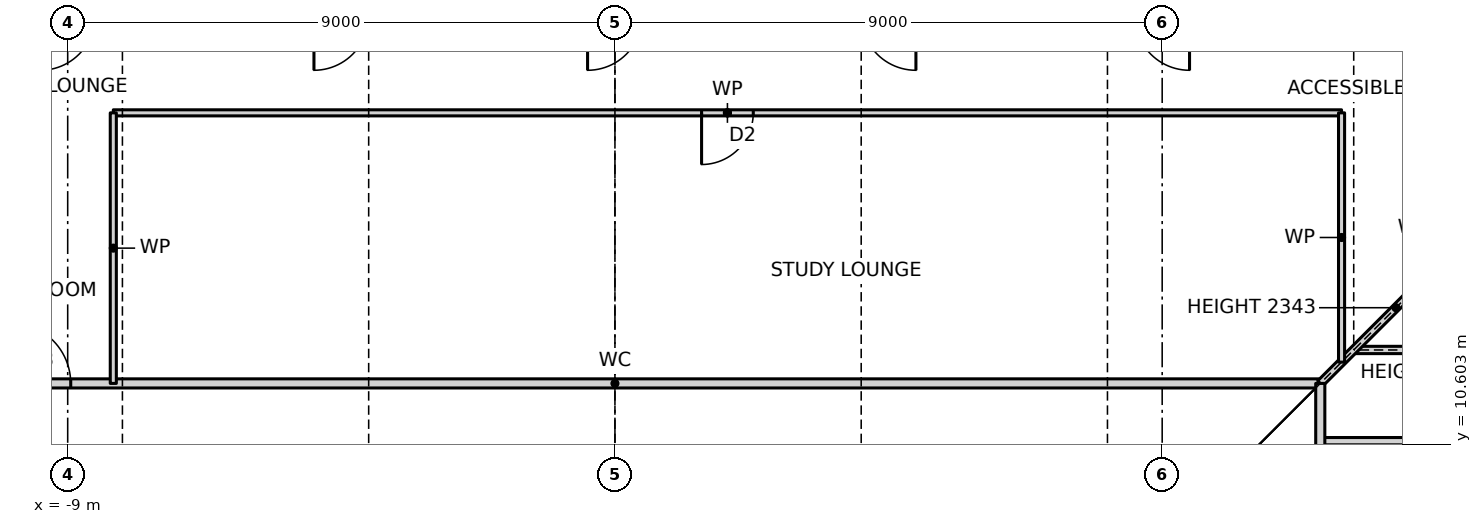
"""IFC4 building model, lengths in metres.
Left out: names, types, materials, properties, quantities, classifications, styles, units other than length and angle.
Written with IfcOpenShell. Run it as: python <this file> out.ifc"""

import sys

from ifc_helpers import new_model, si_unit, direction, frame, frame_2d, origin, place, context, subcontext, project, spatial, rectangle, extrude, element, fill, save


model = new_model("IFC4")
c1 = context("Model", 3, precision=1e-05, world=origin(), true_north=direction((0.0, 1.0)))
c2 = subcontext(c1, "Body", "Model", "MODEL_VIEW")
j1 = project(units=[si_unit("LENGTHUNIT", "METRE"), si_unit("PLANEANGLEUNIT", "RADIAN")], contexts=[c1])
p1 = place(None, origin())
s1 = spatial("IfcSite", under=j1, at=p1, CompositionType="ELEMENT")
p2 = place(p1, origin())
s2 = spatial("IfcBuilding", under=s1, at=p2, CompositionType="ELEMENT")
p3 = place(p2, frame((0.0, 0.0, 18.5)))
s3 = spatial("IfcBuildingStorey", under=s2, at=p3, CompositionType="ELEMENT", Elevation=18.5)
p4 = place(p3, frame((11.6, 10.65, 0.0), z_axis=(0.0, 0.0, 1.0), x_axis=(1.0, 0.0, 0.0)))
e1 = element("IfcWall", 1, at=p4, inside=s3, PredefinedType="PARTITIONING", context=c2, shape_type="SweptSolid", body=[
    extrude(rectangle(XDim=4.45, YDim=0.12, at=frame_2d((2.225, 0.0))), origin(), (0.0, 0.0, 1.0), 3.27),
])
p5 = place(p4, frame((1.8, 0.0, 0.0)))
e2 = element("IfcOpeningElement", 2, at=p5, cuts=e1, PredefinedType="OPENING", context=c2, shape_type="SweptSolid", body=[
    extrude(rectangle(XDim=0.85, YDim=2.1, at=frame_2d((0.425, 1.05))), frame((0.0, 0.07, 0.0), z_axis=(0.0, -1.0, 0.0), x_axis=(1.0, 0.0, 0.0)), (0.0, 0.0, 1.0), 0.14),
])
p6 = place(p3, frame((-11.6, 11.6, 0.0), z_axis=(0.0, 0.0, 1.0), x_axis=(1.0, 0.0, 0.0)))
e3 = element("IfcWall", 3, at=p6, inside=s3, PredefinedType="PARTITIONING", context=c2, shape_type="SweptSolid", body=[
    extrude(rectangle(XDim=23.2, YDim=0.15, at=frame_2d((11.6, 0.0))), origin(), (0.0, 0.0, 1.0), 3.27),
])
p7 = place(p6, frame((1.65, 0.0, 0.0)))
e4 = element("IfcOpeningElement", 4, at=p7, cuts=e3, PredefinedType="OPENING", context=c2, shape_type="SweptSolid", body=[
    extrude(rectangle(XDim=1.0, YDim=2.1, at=frame_2d((0.5, 1.05))), frame((0.0, 0.085, 0.0), z_axis=(0.0, -1.0, 0.0), x_axis=(1.0, 0.0, 0.0)), (0.0, 0.0, 1.0), 0.17),
])
p8 = place(p3, frame((12.15, 12.15, 0.0), z_axis=(0.0, 0.0, 1.0), x_axis=(1.0, 0.0, 0.0)))
e5 = element("IfcWall", 5, at=p8, inside=s3, PredefinedType="PARTITIONING", context=c2, shape_type="SweptSolid", body=[
    extrude(rectangle(XDim=3.9, YDim=0.12, at=frame_2d((1.95, 0.0))), origin(), (0.0, 0.0, 1.0), 2.508),
])
p9 = place(p3, frame((-8.25, 16.05, 0.0), z_axis=(0.0, 0.0, 1.0), x_axis=(1.0, 0.0, 0.0)))
e6 = element("IfcWall", 6, at=p9, inside=s3, PredefinedType="PARTITIONING", context=c2, shape_type="SweptSolid", body=[
    extrude(rectangle(XDim=20.2, YDim=0.1, at=frame_2d((10.1, 0.0))), origin(), (0.0, 0.0, 1.0), 3.27),
])
p10 = place(p9, frame((9.675, 0.0, 0.0)))
e7 = element("IfcOpeningElement", 7, at=p10, cuts=e6, PredefinedType="OPENING", context=c2, shape_type="SweptSolid", body=[
    extrude(rectangle(XDim=0.85, YDim=2.1, at=frame_2d((0.425, 1.05))), frame((0.0, 0.06, 0.0), z_axis=(0.0, -1.0, 0.0), x_axis=(1.0, 0.0, 0.0)), (0.0, 0.0, 1.0), 0.12),
])
p11 = place(p3, frame((11.6, 11.6, 0.0), z_axis=(0.0, 0.0, 1.0), x_axis=(0.707106781187, 0.707106781187, 0.0)))
e8 = element("IfcWall", 8, at=p11, inside=s3, PredefinedType="PARTITIONING", context=c2, shape_type="SweptSolid", body=[
    extrude(rectangle(XDim=5.869, YDim=0.12, at=frame_2d((2.935, 0.0))), origin(), (0.0, 0.0, 1.0), 2.343),
])
p12 = place(p3, frame((11.95, 11.95, 0.0), z_axis=(0.0, 0.0, 1.0), x_axis=(0.0, 1.0, 0.0)))
e9 = element("IfcWall", 9, at=p12, inside=s3, PredefinedType="PARTITIONING", context=c2, shape_type="SweptSolid", body=[
    extrude(rectangle(XDim=4.1, YDim=0.1, at=frame_2d((2.05, 0.0))), origin(), (0.0, 0.0, 1.0), 3.27),
])
p13 = place(p3, frame((11.6, -12.6, 0.0), z_axis=(0.0, 0.0, 1.0), x_axis=(0.0, 1.0, 0.0)))
e10 = element("IfcWall", 10, at=p13, inside=s3, PredefinedType="PARTITIONING", context=c2, shape_type="SweptSolid", body=[
    extrude(rectangle(XDim=24.2, YDim=0.15, at=frame_2d((12.1, 0.0))), origin(), (0.0, 0.0, 1.0), 3.27),
])
p14 = place(p13, frame((21.55, 0.0, 0.0)))
e11 = element("IfcOpeningElement", 11, at=p14, cuts=e10, PredefinedType="OPENING", context=c2, shape_type="SweptSolid", body=[
    extrude(rectangle(XDim=1.0, YDim=2.1, at=frame_2d((0.5, 1.05))), frame((0.0, 0.085, 0.0), z_axis=(0.0, -1.0, 0.0), x_axis=(1.0, 0.0, 0.0)), (0.0, 0.0, 1.0), 0.17),
])
p15 = place(p3, frame((-8.25, 11.6, 0.0), z_axis=(0.0, 0.0, 1.0), x_axis=(0.0, 1.0, 0.0)))
e12 = element("IfcWall", 12, at=p15, inside=s3, PredefinedType="PARTITIONING", context=c2, shape_type="SweptSolid", body=[
    extrude(rectangle(XDim=4.45, YDim=0.1, at=frame_2d((2.225, 0.0))), origin(), (0.0, 0.0, 1.0), 3.27),
])
p16 = place(p7, origin())
e13 = element("IfcDoor", 13, at=p16, inside=s3, OperationType="SINGLE_SWING_LEFT", PredefinedType="DOOR", context=c2, shape_type="SweptSolid", body=[
    extrude(rectangle(XDim=1.0, YDim=2.1, at=frame_2d((0.5, 1.05))), frame((0.0, 0.025, 0.0), z_axis=(0.0, -1.0, 0.0), x_axis=(1.0, 0.0, 0.0)), (0.0, 0.0, 1.0), 0.05),
])
fill(e4, e13)
p17 = place(p10, frame((0.85, 0.0, 0.0), z_axis=(0.0, 0.0, 1.0), x_axis=(-1.0, 0.0, 0.0)))
e14 = element("IfcDoor", 14, at=p17, inside=s3, OperationType="SINGLE_SWING_RIGHT", PredefinedType="DOOR", context=c2, shape_type="SweptSolid", body=[
    extrude(rectangle(XDim=0.85, YDim=2.1, at=frame_2d((0.425, 1.05))), frame((0.0, 0.025, 0.0), z_axis=(0.0, -1.0, 0.0), x_axis=(1.0, 0.0, 0.0)), (0.0, 0.0, 1.0), 0.05),
])
fill(e7, e14)
save(model, sys.argv[1])
